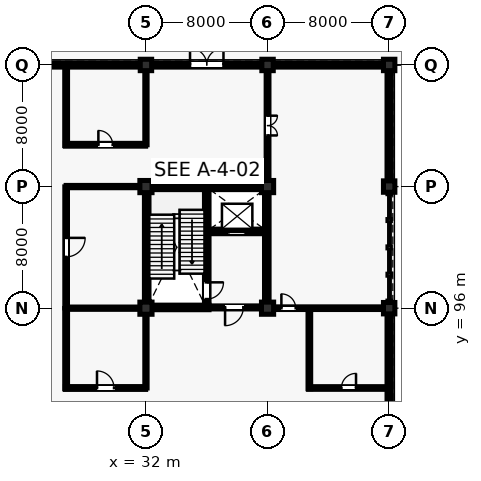
"""IFC4 building model, lengths in metres.
Left out: names, types, materials, properties, quantities, classifications, styles, units other than length and angle.
Written with IfcOpenShell. Run it as: python <this file> out.ifc"""

import sys

from ifc_helpers import new_model, si_unit, direction, frame, frame_2d, origin, origin_2d, place, context, subcontext, project, spatial, rectangle, extrude, element, fill, save


model = new_model("IFC4")
c1 = context("Model", 3, precision=1e-05, world=origin(), true_north=direction((0.0, 1.0)))
c2 = subcontext(c1, "Body", "Model", "MODEL_VIEW")
j1 = project(units=[si_unit("LENGTHUNIT", "METRE"), si_unit("PLANEANGLEUNIT", "RADIAN")], contexts=[c1])
p1 = place(None, origin())
s1 = spatial("IfcSite", under=j1, at=p1, CompositionType="ELEMENT")
p2 = place(p1, origin())
s2 = spatial("IfcBuilding", under=s1, at=p2, CompositionType="ELEMENT")
p3 = place(p2, origin())
s3 = spatial("IfcBuildingStorey", under=s2, at=p3, CompositionType="ELEMENT", Elevation=0.0)
for number, where, z_axis, x_axis in (
    (1, (32.0, 96.0, 0.0), (0.0, 0.0, 1.0), (1.0, 0.0, 0.0)),
    (2, (32.0, 104.0, 0.0), (0.0, 0.0, 1.0), (1.0, 0.0, 0.0)),
):
    element("IfcColumn", number, at=place(p3, frame(where, z_axis=z_axis, x_axis=x_axis)), inside=s3, PredefinedType="COLUMN", context=c2, shape_type="SweptSolid", body=[
        extrude(rectangle(XDim=0.8, YDim=0.8, at=origin_2d()), origin(), (0.0, 0.0, 1.0), 5.28),
    ])
p4 = place(p3, frame((32.0, 112.0, 0.0), z_axis=(0.0, 0.0, 1.0), x_axis=(1.0, 0.0, 0.0)))
e3 = element("IfcColumn", 3, at=p4, inside=s3, PredefinedType="COLUMN", context=c2, shape_type="SweptSolid", body=[
    extrude(rectangle(XDim=0.75, YDim=0.75, at=origin_2d()), origin(), (0.0, 0.0, 1.0), 5.28),
])
for number, where, z_axis, x_axis in (
    (4, (40.0, 96.0, 0.0), (0.0, 0.0, 1.0), (1.0, 0.0, 0.0)),
    (5, (40.0, 104.0, 0.0), (0.0, 0.0, 1.0), (1.0, 0.0, 0.0)),
):
    element("IfcColumn", number, at=place(p3, frame(where, z_axis=z_axis, x_axis=x_axis)), inside=s3, PredefinedType="COLUMN", context=c2, shape_type="SweptSolid", body=[
        extrude(rectangle(XDim=0.8, YDim=0.8, at=origin_2d()), origin(), (0.0, 0.0, 1.0), 5.28),
    ])
for number, where, z_axis, x_axis in (
    (6, (40.0, 112.0, 0.0), (0.0, 0.0, 1.0), (1.0, 0.0, 0.0)),
    (7, (48.0, 96.0, 0.0), (0.0, 0.0, 1.0), (1.0, 0.0, 0.0)),
    (8, (48.0, 104.0, 0.0), (0.0, 0.0, 1.0), (1.0, 0.0, 0.0)),
    (9, (48.0, 112.0, 0.0), (0.0, 0.0, 1.0), (1.0, 0.0, 0.0)),
):
    element("IfcColumn", number, at=place(p3, frame(where, z_axis=z_axis, x_axis=x_axis)), inside=s3, PredefinedType="COLUMN", context=c2, shape_type="SweptSolid", body=[
        extrude(rectangle(XDim=0.75, YDim=0.75, at=origin_2d()), origin(), (0.0, 0.0, 1.0), 5.28),
    ])
p5 = place(p3, frame((24.36, 112.0, 0.0), z_axis=(0.0, 0.0, 1.0), x_axis=(1.0, 0.0, 0.0)))
e10 = element("IfcWall", 10, at=p5, inside=s3, PredefinedType="SOLIDWALL", context=c2, shape_type="SweptSolid", body=[
    extrude(rectangle(XDim=7.28, YDim=0.28, at=frame_2d((3.64, 0.0))), origin(), (0.0, 0.0, 1.0), 4.674),
])
p6 = place(p5, frame((0.71, 0.0, 0.95)))
e11 = element("IfcOpeningElement", 11, at=p6, cuts=e10, PredefinedType="OPENING", context=c2, shape_type="SweptSolid", body=[
    extrude(rectangle(XDim=1.2, YDim=1.8, at=frame_2d((0.6, 0.9))), frame((0.0, 0.15, 0.0), z_axis=(0.0, -1.0, 0.0), x_axis=(1.0, 0.0, 0.0)), (0.0, 0.0, 1.0), 0.3),
])
p7 = place(p5, frame((5.37, 0.0, 0.95)))
e12 = element("IfcOpeningElement", 12, at=p7, cuts=e10, PredefinedType="OPENING", context=c2, shape_type="SweptSolid", body=[
    extrude(rectangle(XDim=1.2, YDim=1.8, at=frame_2d((0.6, 0.9))), frame((0.0, 0.15, 0.0), z_axis=(0.0, -1.0, 0.0), x_axis=(1.0, 0.0, 0.0)), (0.0, 0.0, 1.0), 0.3),
])
p8 = place(p3, frame((32.36, 112.0, 0.0), z_axis=(0.0, 0.0, 1.0), x_axis=(1.0, 0.0, 0.0)))
e13 = element("IfcWall", 13, at=p8, inside=s3, PredefinedType="SOLIDWALL", context=c2, shape_type="SweptSolid", body=[
    extrude(rectangle(XDim=7.28, YDim=0.28, at=frame_2d((3.64, 0.0))), origin(), (0.0, 0.0, 1.0), 4.614),
])
p9 = place(p8, frame((2.54, 0.0, 0.0)))
e14 = element("IfcOpeningElement", 14, at=p9, cuts=e13, PredefinedType="OPENING", context=c2, shape_type="SweptSolid", body=[
    extrude(rectangle(XDim=2.2, YDim=2.5, at=frame_2d((1.1, 1.25))), frame((0.0, 0.15, 0.0), z_axis=(0.0, -1.0, 0.0), x_axis=(1.0, 0.0, 0.0)), (0.0, 0.0, 1.0), 0.3),
])
p10 = place(p3, frame((48.0, 88.36, 0.0), z_axis=(0.0, 0.0, 1.0), x_axis=(0.0, 1.0, 0.0)))
e15 = element("IfcWall", 15, at=p10, inside=s3, PredefinedType="SOLIDWALL", context=c2, shape_type="SweptSolid", body=[
    extrude(rectangle(XDim=7.28, YDim=0.28, at=frame_2d((3.64, 0.0))), origin(), (0.0, 0.0, 1.0), 4.674),
])
p11 = place(p10, frame((0.71, 0.0, 0.95)))
e16 = element("IfcOpeningElement", 16, at=p11, cuts=e15, PredefinedType="OPENING", context=c2, shape_type="SweptSolid", body=[
    extrude(rectangle(XDim=1.2, YDim=1.8, at=frame_2d((0.6, 0.9))), frame((0.0, 0.15, 0.0), z_axis=(0.0, -1.0, 0.0), x_axis=(1.0, 0.0, 0.0)), (0.0, 0.0, 1.0), 0.3),
])
p12 = place(p10, frame((5.37, 0.0, 0.95)))
e17 = element("IfcOpeningElement", 17, at=p12, cuts=e15, PredefinedType="OPENING", context=c2, shape_type="SweptSolid", body=[
    extrude(rectangle(XDim=1.2, YDim=1.8, at=frame_2d((0.6, 0.9))), frame((0.0, 0.15, 0.0), z_axis=(0.0, -1.0, 0.0), x_axis=(1.0, 0.0, 0.0)), (0.0, 0.0, 1.0), 0.3),
])
p13 = place(p3, frame((40.36, 112.0, 0.0), z_axis=(0.0, 0.0, 1.0), x_axis=(1.0, 0.0, 0.0)))
e18 = element("IfcWall", 18, at=p13, inside=s3, PredefinedType="SOLIDWALL", context=c2, shape_type="SweptSolid", body=[
    extrude(rectangle(XDim=7.28, YDim=0.28, at=frame_2d((3.64, 0.0))), origin(), (0.0, 0.0, 1.0), 4.677),
])
p14 = place(p13, frame((2.715, 0.0, 0.9)))
e19 = element("IfcOpeningElement", 19, at=p14, cuts=e18, PredefinedType="OPENING", context=c2, shape_type="SweptSolid", body=[
    extrude(rectangle(XDim=1.85, YDim=2.65, at=frame_2d((0.925, 1.325))), frame((0.0, 0.15, 0.0), z_axis=(0.0, -1.0, 0.0), x_axis=(1.0, 0.0, 0.0)), (0.0, 0.0, 1.0), 0.3),
])
p15 = place(p3, frame((48.0, 104.36, 0.0), z_axis=(0.0, 0.0, 1.0), x_axis=(0.0, 1.0, 0.0)))
e20 = element("IfcWall", 20, at=p15, inside=s3, PredefinedType="SOLIDWALL", context=c2, shape_type="SweptSolid", body=[
    extrude(rectangle(XDim=7.28, YDim=0.28, at=frame_2d((3.64, 0.0))), origin(), (0.0, 0.0, 1.0), 4.677),
])
p16 = place(p15, frame((2.715, 0.0, 0.9)))
e21 = element("IfcOpeningElement", 21, at=p16, cuts=e20, PredefinedType="OPENING", context=c2, shape_type="SweptSolid", body=[
    extrude(rectangle(XDim=1.85, YDim=2.65, at=frame_2d((0.925, 1.325))), frame((0.0, 0.15, 0.0), z_axis=(0.0, -1.0, 0.0), x_axis=(1.0, 0.0, 0.0)), (0.0, 0.0, 1.0), 0.3),
])
for number, where, z_axis, x_axis in (
    (22, (32.05, 96.29, 0.0), (0.0, 0.0, 1.0), (0.0, 1.0, 0.0)),
    (23, (32.29, 103.95, 0.0), (0.0, 0.0, 1.0), (1.0, 0.0, 0.0)),
    (24, (39.95, 96.29, 0.0), (0.0, 0.0, 1.0), (0.0, 1.0, 0.0)),
):
    element("IfcWall", number, at=place(p3, frame(where, z_axis=z_axis, x_axis=x_axis)), inside=s3, PredefinedType="SHEAR", context=c2, shape_type="SweptSolid", body=[
        extrude(rectangle(XDim=7.42, YDim=0.3, at=frame_2d((3.71, 0.0))), origin(), (0.0, 0.0, 1.0), 5.035),
    ])
p17 = place(p3, frame((32.29, 96.05, 0.0), z_axis=(0.0, 0.0, 1.0), x_axis=(1.0, 0.0, 0.0)))
e25 = element("IfcWall", 25, at=p17, inside=s3, PredefinedType="SHEAR", context=c2, shape_type="SweptSolid", body=[
    extrude(rectangle(XDim=3.86, YDim=0.3, at=frame_2d((1.93, 0.0))), origin(), (0.0, 0.0, 1.0), 5.035),
])
p18 = place(p3, frame((36.0, 96.05, 0.0), z_axis=(0.0, 0.0, 1.0), x_axis=(0.0, 1.0, 0.0)))
e26 = element("IfcWall", 26, at=p18, inside=s3, PredefinedType="SHEAR", context=c2, shape_type="SweptSolid", body=[
    extrude(rectangle(XDim=7.9, YDim=0.3, at=frame_2d((3.95, 0.0))), origin(), (0.0, 0.0, 1.0), 5.035),
])
p19 = place(p18, frame((0.55, 0.0, 0.0)))
e27 = element("IfcOpeningElement", 27, at=p19, cuts=e26, PredefinedType="OPENING", context=c2, shape_type="SweptSolid", body=[
    extrude(rectangle(XDim=1.1, YDim=2.15, at=frame_2d((0.55, 1.075))), frame((0.0, 0.16, 0.0), z_axis=(0.0, -1.0, 0.0), x_axis=(1.0, 0.0, 0.0)), (0.0, 0.0, 1.0), 0.32),
])
p20 = place(p3, frame((36.0, 101.05, 0.0), z_axis=(0.0, 0.0, 1.0), x_axis=(1.0, 0.0, 0.0)))
e28 = element("IfcWall", 28, at=p20, inside=s3, PredefinedType="SHEAR", context=c2, shape_type="SweptSolid", body=[
    extrude(rectangle(XDim=3.95, YDim=0.3, at=frame_2d((1.975, 0.0))), origin(), (0.0, 0.0, 1.0), 5.035),
])
p21 = place(p20, frame((1.425, 0.0, 0.0)))
e29 = element("IfcOpeningElement", 29, at=p21, cuts=e28, PredefinedType="OPENING", context=c2, shape_type="SweptSolid", body=[
    extrude(rectangle(XDim=1.1, YDim=2.2, at=frame_2d((0.55, 1.1))), frame((0.0, 0.16, 0.0), z_axis=(0.0, -1.0, 0.0), x_axis=(1.0, 0.0, 0.0)), (0.0, 0.0, 1.0), 0.32),
])
p22 = place(p3, frame((36.0, 96.05, 0.0), z_axis=(0.0, 0.0, 1.0), x_axis=(1.0, 0.0, 0.0)))
e30 = element("IfcWall", 30, at=p22, inside=s3, PredefinedType="PARTITIONING", context=c2, shape_type="SweptSolid", body=[
    extrude(rectangle(XDim=3.61, YDim=0.2, at=frame_2d((1.805, 0.0))), origin(), (0.0, 0.0, 1.0), 4.327),
])
p23 = place(p22, frame((1.205, 0.0, 0.0)))
e31 = element("IfcOpeningElement", 31, at=p23, cuts=e30, PredefinedType="OPENING", context=c2, shape_type="SweptSolid", body=[
    extrude(rectangle(XDim=1.2, YDim=2.15, at=frame_2d((0.6, 1.075))), frame((0.0, 0.11, 0.0), z_axis=(0.0, -1.0, 0.0), x_axis=(1.0, 0.0, 0.0)), (0.0, 0.0, 1.0), 0.22),
])
p24 = place(p3, frame((26.7, 90.75, 0.0), z_axis=(0.0, 0.0, 1.0), x_axis=(1.0, 0.0, 0.0)))
e32 = element("IfcWall", 32, at=p24, inside=s3, PredefinedType="PARTITIONING", context=c2, shape_type="SweptSolid", body=[
    extrude(rectangle(XDim=5.28, YDim=0.185, at=frame_2d((2.64, 0.0))), origin(), (0.0, 0.0, 1.0), 4.471),
])
p25 = place(p24, frame((2.08, 0.0, 0.0)))
e33 = element("IfcOpeningElement", 33, at=p25, cuts=e32, PredefinedType="OPENING", context=c2, shape_type="SweptSolid", body=[
    extrude(rectangle(XDim=1.12, YDim=2.22, at=frame_2d((0.56, 1.11))), frame((0.0, 0.103, 0.0), z_axis=(0.0, -1.0, 0.0), x_axis=(1.0, 0.0, 0.0)), (0.0, 0.0, 1.0), 0.205),
])
p26 = place(p3, frame((26.75, 90.7, 0.0), z_axis=(0.0, 0.0, 1.0), x_axis=(0.0, 1.0, 0.0)))
e34 = element("IfcWall", 34, at=p26, inside=s3, PredefinedType="PARTITIONING", context=c2, shape_type="SweptSolid", body=[
    extrude(rectangle(XDim=5.28, YDim=0.185, at=frame_2d((2.64, 0.0))), origin(), (0.0, 0.0, 1.0), 4.404),
])
p27 = place(p3, frame((26.75, 96.0, 0.0), z_axis=(0.0, 0.0, 1.0), x_axis=(1.0, 0.0, 0.0)))
e35 = element("IfcWall", 35, at=p27, inside=s3, PredefinedType="PARTITIONING", context=c2, shape_type="SweptSolid", body=[
    extrude(rectangle(XDim=4.84, YDim=0.15, at=frame_2d((2.42, 0.0))), origin(), (0.0, 0.0, 1.0), 4.404),
])
p28 = place(p3, frame((32.0, 90.75, 0.0), z_axis=(0.0, 0.0, 1.0), x_axis=(0.0, 1.0, 0.0)))
e36 = element("IfcWall", 36, at=p28, inside=s3, PredefinedType="PARTITIONING", context=c2, shape_type="SweptSolid", body=[
    extrude(rectangle(XDim=4.84, YDim=0.15, at=frame_2d((2.42, 0.0))), origin(), (0.0, 0.0, 1.0), 4.471),
])
p29 = place(p3, frame((26.75, 96.02, 0.0), z_axis=(0.0, 0.0, 1.0), x_axis=(0.0, 1.0, 0.0)))
e37 = element("IfcWall", 37, at=p29, inside=s3, PredefinedType="PARTITIONING", context=c2, shape_type="SweptSolid", body=[
    extrude(rectangle(XDim=7.96, YDim=0.175, at=frame_2d((3.98, 0.0))), origin(), (0.0, 0.0, 1.0), 4.327),
])
p30 = place(p29, frame((3.355, 0.0, 0.0)))
e38 = element("IfcOpeningElement", 38, at=p30, cuts=e37, PredefinedType="OPENING", context=c2, shape_type="SweptSolid", body=[
    extrude(rectangle(XDim=1.25, YDim=2.18, at=frame_2d((0.625, 1.09))), frame((0.0, 0.097, 0.0), z_axis=(0.0, -1.0, 0.0), x_axis=(1.0, 0.0, 0.0)), (0.0, 0.0, 1.0), 0.195),
])
p31 = place(p3, frame((26.75, 104.0, 0.0), z_axis=(0.0, 0.0, 1.0), x_axis=(1.0, 0.0, 0.0)))
e39 = element("IfcWall", 39, at=p31, inside=s3, PredefinedType="PARTITIONING", context=c2, shape_type="SweptSolid", body=[
    extrude(rectangle(XDim=4.84, YDim=0.15, at=frame_2d((2.42, 0.0))), origin(), (0.0, 0.0, 1.0), 4.327),
])
p32 = place(p3, frame((26.7, 106.75, 0.0), z_axis=(0.0, 0.0, 1.0), x_axis=(1.0, 0.0, 0.0)))
e40 = element("IfcWall", 40, at=p32, inside=s3, PredefinedType="PARTITIONING", context=c2, shape_type="SweptSolid", body=[
    extrude(rectangle(XDim=5.28, YDim=0.185, at=frame_2d((2.64, 0.0))), origin(), (0.0, 0.0, 1.0), 4.412),
])
p33 = place(p32, frame((2.17, 0.0, 0.0)))
e41 = element("IfcOpeningElement", 41, at=p33, cuts=e40, PredefinedType="OPENING", context=c2, shape_type="SweptSolid", body=[
    extrude(rectangle(XDim=0.94, YDim=2.12, at=frame_2d((0.47, 1.06))), frame((0.0, 0.103, 0.0), z_axis=(0.0, -1.0, 0.0), x_axis=(1.0, 0.0, 0.0)), (0.0, 0.0, 1.0), 0.205),
])
p34 = place(p3, frame((26.75, 106.7, 0.0), z_axis=(0.0, 0.0, 1.0), x_axis=(0.0, 1.0, 0.0)))
e42 = element("IfcWall", 42, at=p34, inside=s3, PredefinedType="PARTITIONING", context=c2, shape_type="SweptSolid", body=[
    extrude(rectangle(XDim=5.28, YDim=0.185, at=frame_2d((2.64, 0.0))), origin(), (0.0, 0.0, 1.0), 4.667),
])
p35 = place(p3, frame((32.0, 106.75, 0.0), z_axis=(0.0, 0.0, 1.0), x_axis=(0.0, 1.0, 0.0)))
e43 = element("IfcWall", 43, at=p35, inside=s3, PredefinedType="PARTITIONING", context=c2, shape_type="SweptSolid", body=[
    extrude(rectangle(XDim=4.865, YDim=0.15, at=frame_2d((2.433, 0.0))), origin(), (0.0, 0.0, 1.0), 4.412),
])
p36 = place(p3, frame((42.7, 90.75, 0.0), z_axis=(0.0, 0.0, 1.0), x_axis=(1.0, 0.0, 0.0)))
e44 = element("IfcWall", 44, at=p36, inside=s3, PredefinedType="PARTITIONING", context=c2, shape_type="SweptSolid", body=[
    extrude(rectangle(XDim=5.28, YDim=0.175, at=frame_2d((2.64, 0.0))), origin(), (0.0, 0.0, 1.0), 4.667),
])
p37 = place(p36, frame((2.16, 0.0, 0.0)))
e45 = element("IfcOpeningElement", 45, at=p37, cuts=e44, PredefinedType="OPENING", context=c2, shape_type="SweptSolid", body=[
    extrude(rectangle(XDim=0.96, YDim=2.14, at=frame_2d((0.48, 1.07))), frame((0.0, 0.097, 0.0), z_axis=(0.0, -1.0, 0.0), x_axis=(1.0, 0.0, 0.0)), (0.0, 0.0, 1.0), 0.195),
])
p38 = place(p3, frame((42.75, 90.7, 0.0), z_axis=(0.0, 0.0, 1.0), x_axis=(0.0, 1.0, 0.0)))
e46 = element("IfcWall", 46, at=p38, inside=s3, PredefinedType="PARTITIONING", context=c2, shape_type="SweptSolid", body=[
    extrude(rectangle(XDim=5.28, YDim=0.175, at=frame_2d((2.64, 0.0))), origin(), (0.0, 0.0, 1.0), 4.403),
])
p39 = place(p3, frame((40.0, 104.39, 0.0), z_axis=(0.0, 0.0, 1.0), x_axis=(0.0, 1.0, 0.0)))
e47 = element("IfcWall", 47, at=p39, inside=s3, PredefinedType="PARTITIONING", context=c2, shape_type="SweptSolid", body=[
    extrude(rectangle(XDim=7.245, YDim=0.185, at=frame_2d((3.623, 0.0))), origin(), (0.0, 0.0, 1.0), 4.404),
])
p40 = place(p39, frame((2.972, 0.0, 0.0)))
e48 = element("IfcOpeningElement", 48, at=p40, cuts=e47, PredefinedType="OPENING", context=c2, shape_type="SweptSolid", body=[
    extrude(rectangle(XDim=1.3, YDim=2.2, at=frame_2d((0.65, 1.1))), frame((0.0, 0.103, 0.0), z_axis=(0.0, -1.0, 0.0), x_axis=(1.0, 0.0, 0.0)), (0.0, 0.0, 1.0), 0.205),
])
p41 = place(p3, frame((40.39, 96.0, 0.0), z_axis=(0.0, 0.0, 1.0), x_axis=(1.0, 0.0, 0.0)))
e49 = element("IfcWall", 49, at=p41, inside=s3, PredefinedType="PARTITIONING", context=c2, shape_type="SweptSolid", body=[
    extrude(rectangle(XDim=7.245, YDim=0.175, at=frame_2d((3.623, 0.0))), origin(), (0.0, 0.0, 1.0), 4.403),
])
p42 = place(p41, frame((0.52, 0.0, 0.0)))
e50 = element("IfcOpeningElement", 50, at=p42, cuts=e49, PredefinedType="OPENING", context=c2, shape_type="SweptSolid", body=[
    extrude(rectangle(XDim=0.94, YDim=2.12, at=frame_2d((0.47, 1.06))), frame((0.0, 0.097, 0.0), z_axis=(0.0, -1.0, 0.0), x_axis=(1.0, 0.0, 0.0)), (0.0, 0.0, 1.0), 0.195),
])
p43 = place(p6, origin())
e51 = element("IfcWindow", 51, at=p43, inside=s3, PartitioningType="SINGLE_PANEL", PredefinedType="WINDOW", context=c2, shape_type="SweptSolid", body=[
    extrude(rectangle(XDim=1.2, YDim=1.8, at=frame_2d((0.6, 0.9))), frame((0.0, 0.03, 0.0), z_axis=(0.0, -1.0, 0.0), x_axis=(1.0, 0.0, 0.0)), (0.0, 0.0, 1.0), 0.06),
])
fill(e11, e51)
p44 = place(p7, origin())
e52 = element("IfcWindow", 52, at=p44, inside=s3, PartitioningType="SINGLE_PANEL", PredefinedType="WINDOW", context=c2, shape_type="SweptSolid", body=[
    extrude(rectangle(XDim=1.2, YDim=1.8, at=frame_2d((0.6, 0.9))), frame((0.0, 0.03, 0.0), z_axis=(0.0, -1.0, 0.0), x_axis=(1.0, 0.0, 0.0)), (0.0, 0.0, 1.0), 0.06),
])
fill(e12, e52)
p45 = place(p9, origin())
e53 = element("IfcDoor", 53, at=p45, inside=s3, OperationType="DOUBLE_DOOR_SINGLE_SWING", PredefinedType="DOOR", context=c2, shape_type="SweptSolid", body=[
    extrude(rectangle(XDim=2.2, YDim=2.5, at=frame_2d((1.1, 1.25))), frame((0.0, 0.025, 0.0), z_axis=(0.0, -1.0, 0.0), x_axis=(1.0, 0.0, 0.0)), (0.0, 0.0, 1.0), 0.05),
])
fill(e14, e53)
p46 = place(p11, origin())
e54 = element("IfcWindow", 54, at=p46, inside=s3, PartitioningType="SINGLE_PANEL", PredefinedType="WINDOW", context=c2, shape_type="SweptSolid", body=[
    extrude(rectangle(XDim=1.2, YDim=1.8, at=frame_2d((0.6, 0.9))), frame((0.0, 0.03, 0.0), z_axis=(0.0, -1.0, 0.0), x_axis=(1.0, 0.0, 0.0)), (0.0, 0.0, 1.0), 0.06),
])
fill(e16, e54)
p47 = place(p12, origin())
e55 = element("IfcWindow", 55, at=p47, inside=s3, PartitioningType="SINGLE_PANEL", PredefinedType="WINDOW", context=c2, shape_type="SweptSolid", body=[
    extrude(rectangle(XDim=1.2, YDim=1.8, at=frame_2d((0.6, 0.9))), frame((0.0, 0.03, 0.0), z_axis=(0.0, -1.0, 0.0), x_axis=(1.0, 0.0, 0.0)), (0.0, 0.0, 1.0), 0.06),
])
fill(e17, e55)
p48 = place(p14, origin())
e56 = element("IfcWindow", 56, at=p48, inside=s3, PartitioningType="SINGLE_PANEL", PredefinedType="WINDOW", context=c2, shape_type="SweptSolid", body=[
    extrude(rectangle(XDim=1.85, YDim=2.65, at=frame_2d((0.925, 1.325))), frame((0.0, 0.03, 0.0), z_axis=(0.0, -1.0, 0.0), x_axis=(1.0, 0.0, 0.0)), (0.0, 0.0, 1.0), 0.06),
])
fill(e19, e56)
p49 = place(p16, origin())
e57 = element("IfcWindow", 57, at=p49, inside=s3, PartitioningType="SINGLE_PANEL", PredefinedType="WINDOW", context=c2, shape_type="SweptSolid", body=[
    extrude(rectangle(XDim=1.85, YDim=2.65, at=frame_2d((0.925, 1.325))), frame((0.0, 0.03, 0.0), z_axis=(0.0, -1.0, 0.0), x_axis=(1.0, 0.0, 0.0)), (0.0, 0.0, 1.0), 0.06),
])
fill(e21, e57)
p50 = place(p19, frame((1.1, 0.0, 0.0), z_axis=(0.0, 0.0, 1.0), x_axis=(-1.0, 0.0, 0.0)))
e58 = element("IfcDoor", 58, at=p50, inside=s3, OperationType="SINGLE_SWING_RIGHT", PredefinedType="DOOR", context=c2, shape_type="SweptSolid", body=[
    extrude(rectangle(XDim=1.1, YDim=2.15, at=frame_2d((0.55, 1.075))), frame((0.0, 0.025, 0.0), z_axis=(0.0, -1.0, 0.0), x_axis=(1.0, 0.0, 0.0)), (0.0, 0.0, 1.0), 0.05),
])
fill(e27, e58)
p51 = place(p21, origin())
e59 = element("IfcDoor", 59, at=p51, inside=s3, OperationType="SLIDING_TO_LEFT", PredefinedType="DOOR", context=c2, shape_type="SweptSolid", body=[
    extrude(rectangle(XDim=1.1, YDim=2.2, at=frame_2d((0.55, 1.1))), frame((0.0, 0.025, 0.0), z_axis=(0.0, -1.0, 0.0), x_axis=(1.0, 0.0, 0.0)), (0.0, 0.0, 1.0), 0.05),
])
fill(e29, e59)
p52 = place(p23, frame((1.2, 0.0, 0.0), z_axis=(0.0, 0.0, 1.0), x_axis=(-1.0, 0.0, 0.0)))
e60 = element("IfcDoor", 60, at=p52, inside=s3, OperationType="SINGLE_SWING_LEFT", PredefinedType="DOOR", context=c2, shape_type="SweptSolid", body=[
    extrude(rectangle(XDim=1.2, YDim=2.15, at=frame_2d((0.6, 1.075))), frame((0.0, 0.025, 0.0), z_axis=(0.0, -1.0, 0.0), x_axis=(1.0, 0.0, 0.0)), (0.0, 0.0, 1.0), 0.05),
])
fill(e31, e60)
p53 = place(p25, origin())
e61 = element("IfcDoor", 61, at=p53, inside=s3, OperationType="SINGLE_SWING_LEFT", PredefinedType="DOOR", context=c2, shape_type="SweptSolid", body=[
    extrude(rectangle(XDim=1.12, YDim=2.22, at=frame_2d((0.56, 1.11))), frame((0.0, 0.025, 0.0), z_axis=(0.0, -1.0, 0.0), x_axis=(1.0, 0.0, 0.0)), (0.0, 0.0, 1.0), 0.05),
])
fill(e33, e61)
p54 = place(p30, frame((1.25, 0.0, 0.0), z_axis=(0.0, 0.0, 1.0), x_axis=(-1.0, 0.0, 0.0)))
e62 = element("IfcDoor", 62, at=p54, inside=s3, OperationType="SINGLE_SWING_RIGHT", PredefinedType="DOOR", context=c2, shape_type="SweptSolid", body=[
    extrude(rectangle(XDim=1.25, YDim=2.18, at=frame_2d((0.625, 1.09))), frame((0.0, 0.025, 0.0), z_axis=(0.0, -1.0, 0.0), x_axis=(1.0, 0.0, 0.0)), (0.0, 0.0, 1.0), 0.05),
])
fill(e38, e62)
p55 = place(p33, origin())
e63 = element("IfcDoor", 63, at=p55, inside=s3, OperationType="SINGLE_SWING_LEFT", PredefinedType="DOOR", context=c2, shape_type="SweptSolid", body=[
    extrude(rectangle(XDim=0.94, YDim=2.12, at=frame_2d((0.47, 1.06))), frame((0.0, 0.025, 0.0), z_axis=(0.0, -1.0, 0.0), x_axis=(1.0, 0.0, 0.0)), (0.0, 0.0, 1.0), 0.05),
])
fill(e41, e63)
p56 = place(p37, origin())
e64 = element("IfcDoor", 64, at=p56, inside=s3, OperationType="SINGLE_SWING_RIGHT", PredefinedType="DOOR", context=c2, shape_type="SweptSolid", body=[
    extrude(rectangle(XDim=0.96, YDim=2.14, at=frame_2d((0.48, 1.07))), frame((0.0, 0.025, 0.0), z_axis=(0.0, -1.0, 0.0), x_axis=(1.0, 0.0, 0.0)), (0.0, 0.0, 1.0), 0.05),
])
fill(e45, e64)
p57 = place(p40, frame((1.3, 0.0, 0.0), z_axis=(0.0, 0.0, 1.0), x_axis=(-1.0, 0.0, 0.0)))
e65 = element("IfcDoor", 65, at=p57, inside=s3, OperationType="DOUBLE_DOOR_SINGLE_SWING", PredefinedType="DOOR", context=c2, shape_type="SweptSolid", body=[
    extrude(rectangle(XDim=1.3, YDim=2.2, at=frame_2d((0.65, 1.1))), frame((0.0, 0.025, 0.0), z_axis=(0.0, -1.0, 0.0), x_axis=(1.0, 0.0, 0.0)), (0.0, 0.0, 1.0), 0.05),
])
fill(e48, e65)
p58 = place(p42, origin())
e66 = element("IfcDoor", 66, at=p58, inside=s3, OperationType="SINGLE_SWING_LEFT", PredefinedType="DOOR", context=c2, shape_type="SweptSolid", body=[
    extrude(rectangle(XDim=0.94, YDim=2.12, at=frame_2d((0.47, 1.06))), frame((0.0, 0.025, 0.0), z_axis=(0.0, -1.0, 0.0), x_axis=(1.0, 0.0, 0.0)), (0.0, 0.0, 1.0), 0.05),
])
fill(e50, e66)
save(model, sys.argv[1])
